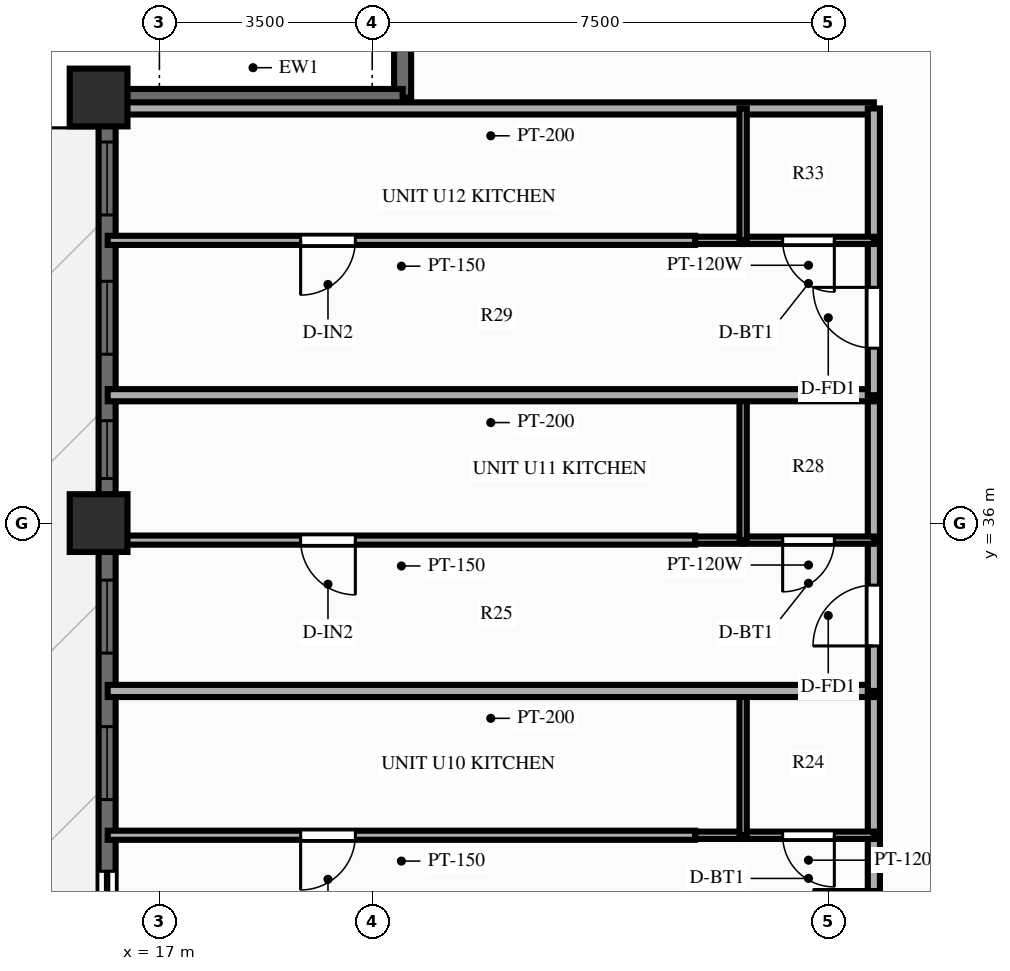
"""IFC4 building model, lengths in metres.
Left out: names, types, materials, properties, quantities, classifications, styles, units other than length and angle.
Written with IfcOpenShell. Run it as: python <this file> out.ifc"""

import sys

from ifc_helpers import new_model, si_unit, direction, frame, frame_2d, origin, origin_2d, place, context, subcontext, project, spatial, rectangle, extrude, source, transform, mapped, element, fill, save


model = new_model("IFC4")
c1 = context("Model", 3, precision=1e-05, world=origin(), true_north=direction((0.0, 1.0)))
c2 = subcontext(c1, "Body", "Model", "MODEL_VIEW")
j1 = project(units=[si_unit("LENGTHUNIT", "METRE"), si_unit("PLANEANGLEUNIT", "RADIAN")], contexts=[c1])
p1 = place(None, origin())
s1 = spatial("IfcSite", under=j1, at=p1, CompositionType="ELEMENT")
p2 = place(p1, origin())
s2 = spatial("IfcBuilding", under=s1, at=p2, CompositionType="ELEMENT")
p3 = place(p2, frame((0.0, 0.0, 169.0)))
s3 = spatial("IfcBuildingStorey", under=s2, at=p3, CompositionType="ELEMENT", Elevation=169.0)
m1 = source(origin(), c2, "Body", "SweptSolid", [
    extrude(rectangle(XDim=0.95, YDim=0.95, at=origin_2d()), origin(), (0.0, 0.0, 1.0), 3.9),
])
for number, where, z_axis, x_axis in (
    (1, (16.0, 43.0, 0.0), (0.0, 0.0, 1.0), (1.0, 0.0, 0.0)),
    (2, (16.0, 36.0, 0.0), (0.0, 0.0, 1.0), (1.0, 0.0, 0.0)),
):
    element("IfcColumn", number, at=place(p3, frame(where, z_axis=z_axis, x_axis=x_axis)), inside=s3, PredefinedType="COLUMN", context=c2, shape_type="MappedRepresentation", body=[
        mapped(m1, transform((0.0, 0.0, 0.0), scale=1.0)),
    ])
p4 = place(p3, frame((16.14, 11.0, 0.0), z_axis=(0.0, 0.0, 1.0), x_axis=(0.0, 1.0, 0.0)))
e3 = element("IfcWall", 3, at=p4, inside=s3, PredefinedType="SOLIDWALL", context=c2, shape_type="SweptSolid", body=[
    extrude(rectangle(XDim=32.0, YDim=0.28, at=frame_2d((16.0, 0.0))), origin(), (0.0, 0.0, 1.0), 2.44),
])
p5 = place(p4, frame((0.8, 0.0, 0.25)))
e4 = element("IfcOpeningElement", 4, at=p5, cuts=e3, PredefinedType="OPENING", context=c2, shape_type="SweptSolid", body=[
    extrude(rectangle(XDim=1.2, YDim=1.5, at=frame_2d((0.6, 0.75))), frame((0.0, 0.152, 0.0), z_axis=(0.0, -1.0, 0.0), x_axis=(1.0, 0.0, 0.0)), (0.0, 0.0, 1.0), 0.304),
])
p6 = place(p4, frame((3.239, 0.0, 0.25)))
e5 = element("IfcOpeningElement", 5, at=p6, cuts=e3, PredefinedType="OPENING", context=c2, shape_type="SweptSolid", body=[
    extrude(rectangle(XDim=1.2, YDim=1.5, at=frame_2d((0.6, 0.75))), frame((0.0, 0.152, 0.0), z_axis=(0.0, -1.0, 0.0), x_axis=(1.0, 0.0, 0.0)), (0.0, 0.0, 1.0), 0.304),
])
p7 = place(p4, frame((5.588, 0.0, 0.25)))
e6 = element("IfcOpeningElement", 6, at=p7, cuts=e3, PredefinedType="OPENING", context=c2, shape_type="SweptSolid", body=[
    extrude(rectangle(XDim=0.7, YDim=1.5, at=frame_2d((0.35, 0.75))), frame((0.0, 0.152, 0.0), z_axis=(0.0, -1.0, 0.0), x_axis=(1.0, 0.0, 0.0)), (0.0, 0.0, 1.0), 0.304),
])
p8 = place(p4, frame((8.085, 0.0, 0.25)))
e7 = element("IfcOpeningElement", 7, at=p8, cuts=e3, PredefinedType="OPENING", context=c2, shape_type="SweptSolid", body=[
    extrude(rectangle(XDim=1.2, YDim=1.5, at=frame_2d((0.6, 0.75))), frame((0.0, 0.152, 0.0), z_axis=(0.0, -1.0, 0.0), x_axis=(1.0, 0.0, 0.0)), (0.0, 0.0, 1.0), 0.304),
])
p9 = place(p4, frame((10.575, 0.0, 0.25)))
e8 = element("IfcOpeningElement", 8, at=p9, cuts=e3, PredefinedType="OPENING", context=c2, shape_type="SweptSolid", body=[
    extrude(rectangle(XDim=1.2, YDim=1.5, at=frame_2d((0.6, 0.75))), frame((0.0, 0.152, 0.0), z_axis=(0.0, -1.0, 0.0), x_axis=(1.0, 0.0, 0.0)), (0.0, 0.0, 1.0), 0.304),
])
p10 = place(p4, frame((13.007, 0.0, 0.25)))
e9 = element("IfcOpeningElement", 9, at=p10, cuts=e3, PredefinedType="OPENING", context=c2, shape_type="SweptSolid", body=[
    extrude(rectangle(XDim=1.2, YDim=1.5, at=frame_2d((0.6, 0.75))), frame((0.0, 0.152, 0.0), z_axis=(0.0, -1.0, 0.0), x_axis=(1.0, 0.0, 0.0)), (0.0, 0.0, 1.0), 0.304),
])
p11 = place(p4, frame((15.4, 0.0, 0.25)))
e10 = element("IfcOpeningElement", 10, at=p11, cuts=e3, PredefinedType="OPENING", context=c2, shape_type="SweptSolid", body=[
    extrude(rectangle(XDim=1.2, YDim=1.5, at=frame_2d((0.6, 0.75))), frame((0.0, 0.152, 0.0), z_axis=(0.0, -1.0, 0.0), x_axis=(1.0, 0.0, 0.0)), (0.0, 0.0, 1.0), 0.304),
])
p12 = place(p4, frame((17.673, 0.0, 0.0)))
e11 = element("IfcOpeningElement", 11, at=p12, cuts=e3, PredefinedType="OPENING", context=c2, shape_type="SweptSolid", body=[
    extrude(rectangle(XDim=1.6, YDim=2.15, at=frame_2d((0.8, 1.075))), frame((0.0, 0.152, 0.0), z_axis=(0.0, -1.0, 0.0), x_axis=(1.0, 0.0, 0.0)), (0.0, 0.0, 1.0), 0.304),
])
p13 = place(p4, frame((20.452, 0.0, 0.25)))
e12 = element("IfcOpeningElement", 12, at=p13, cuts=e3, PredefinedType="OPENING", context=c2, shape_type="SweptSolid", body=[
    extrude(rectangle(XDim=1.2, YDim=1.5, at=frame_2d((0.6, 0.75))), frame((0.0, 0.152, 0.0), z_axis=(0.0, -1.0, 0.0), x_axis=(1.0, 0.0, 0.0)), (0.0, 0.0, 1.0), 0.304),
])
p14 = place(p4, frame((22.862, 0.0, 0.25)))
e13 = element("IfcOpeningElement", 13, at=p14, cuts=e3, PredefinedType="OPENING", context=c2, shape_type="SweptSolid", body=[
    extrude(rectangle(XDim=1.2, YDim=1.5, at=frame_2d((0.6, 0.75))), frame((0.0, 0.152, 0.0), z_axis=(0.0, -1.0, 0.0), x_axis=(1.0, 0.0, 0.0)), (0.0, 0.0, 1.0), 0.304),
])
p15 = place(p4, frame((25.734, 0.0, 0.25)))
e14 = element("IfcOpeningElement", 14, at=p15, cuts=e3, PredefinedType="OPENING", context=c2, shape_type="SweptSolid", body=[
    extrude(rectangle(XDim=0.95, YDim=1.5, at=frame_2d((0.475, 0.75))), frame((0.0, 0.152, 0.0), z_axis=(0.0, -1.0, 0.0), x_axis=(1.0, 0.0, 0.0)), (0.0, 0.0, 1.0), 0.304),
])
p16 = place(p4, frame((27.777, 0.0, 0.25)))
e15 = element("IfcOpeningElement", 15, at=p16, cuts=e3, PredefinedType="OPENING", context=c2, shape_type="SweptSolid", body=[
    extrude(rectangle(XDim=1.2, YDim=1.5, at=frame_2d((0.6, 0.75))), frame((0.0, 0.152, 0.0), z_axis=(0.0, -1.0, 0.0), x_axis=(1.0, 0.0, 0.0)), (0.0, 0.0, 1.0), 0.304),
])
p17 = place(p4, frame((30.068, 0.0, 0.25)))
e16 = element("IfcOpeningElement", 16, at=p17, cuts=e3, PredefinedType="OPENING", context=c2, shape_type="SweptSolid", body=[
    extrude(rectangle(XDim=1.2, YDim=1.5, at=frame_2d((0.6, 0.75))), frame((0.0, 0.152, 0.0), z_axis=(0.0, -1.0, 0.0), x_axis=(1.0, 0.0, 0.0)), (0.0, 0.0, 1.0), 0.304),
])
for number, where, z_axis, x_axis in (
    (17, (21.0, 43.0, 0.0), (0.0, 0.0, 1.0), (0.0, 1.0, 0.0)),
    (18, (16.08, 43.0, 0.0), (0.0, 0.0, 1.0), (1.0, 0.0, 0.0)),
):
    element("IfcWall", number, at=place(p3, frame(where, z_axis=z_axis, x_axis=x_axis)), inside=s3, PredefinedType="SOLIDWALL", context=c2, shape_type="SweptSolid", body=[
        extrude(rectangle(XDim=4.92, YDim=0.28, at=frame_2d((2.46, 0.0))), origin(), (0.0, 0.0, 1.0), 2.44),
    ])
p18 = place(p3, frame((28.75, 42.82, 0.0), z_axis=(0.0, 0.0, 1.0), x_axis=(-1.0, 0.0, 0.0)))
e19 = element("IfcWall", 19, at=p18, inside=s3, PredefinedType="PARTITIONING", context=c2, shape_type="SweptSolid", body=[
    extrude(rectangle(XDim=12.6, YDim=0.2, at=frame_2d((6.3, 0.0))), origin(), (0.0, 0.0, 1.0), 2.24),
])
p19 = place(p3, frame((28.75, 28.08, 0.0), z_axis=(0.0, 0.0, 1.0), x_axis=(0.0, 1.0, 0.0)))
e20 = element("IfcWall", 20, at=p19, inside=s3, PredefinedType="PARTITIONING", context=c2, shape_type="SweptSolid", body=[
    extrude(rectangle(XDim=2.786, YDim=0.2, at=frame_2d((1.393, 0.0))), origin(), (0.0, 0.0, 1.0), 3.56),
])
p20 = place(p19, frame((0.893, 0.0, 0.0)))
e21 = element("IfcOpeningElement", 21, at=p20, cuts=e20, PredefinedType="OPENING", context=c2, shape_type="SweptSolid", body=[
    extrude(rectangle(XDim=1.0, YDim=2.15, at=frame_2d((0.5, 1.075))), frame((0.0, 0.112, 0.0), z_axis=(0.0, -1.0, 0.0), x_axis=(1.0, 0.0, 0.0)), (0.0, 0.0, 1.0), 0.224),
])
p21 = place(p3, frame((28.75, 30.866, 0.0), z_axis=(0.0, 0.0, 1.0), x_axis=(0.0, 1.0, 0.0)))
e22 = element("IfcWall", 22, at=p21, inside=s3, PredefinedType="PARTITIONING", context=c2, shape_type="SweptSolid", body=[
    extrude(rectangle(XDim=2.373, YDim=0.2, at=frame_2d((1.187, 0.0))), origin(), (0.0, 0.0, 1.0), 3.56),
])
p22 = place(p3, frame((28.75, 30.866, 0.0), z_axis=(0.0, 0.0, 1.0), x_axis=(-1.0, 0.0, 0.0)))
e23 = element("IfcWall", 23, at=p22, inside=s3, PredefinedType="PARTITIONING", context=c2, shape_type="SweptSolid", body=[
    extrude(rectangle(XDim=2.15, YDim=0.12, at=frame_2d((1.075, 0.0))), origin(), (0.0, 0.0, 1.0), 3.56),
])
p23 = place(p22, frame((0.65, 0.0, 0.0)))
e24 = element("IfcOpeningElement", 24, at=p23, cuts=e23, PredefinedType="OPENING", context=c2, shape_type="SweptSolid", body=[
    extrude(rectangle(XDim=0.85, YDim=2.05, at=frame_2d((0.425, 1.025))), frame((0.0, 0.072, 0.0), z_axis=(0.0, -1.0, 0.0), x_axis=(1.0, 0.0, 0.0)), (0.0, 0.0, 1.0), 0.144),
])
p24 = place(p3, frame((26.6, 30.866, 0.0), z_axis=(0.0, 0.0, 1.0), x_axis=(-1.0, 0.0, 0.0)))
e25 = element("IfcWall", 25, at=p24, inside=s3, PredefinedType="PARTITIONING", context=c2, shape_type="SweptSolid", body=[
    extrude(rectangle(XDim=0.79, YDim=0.12, at=frame_2d((0.395, 0.0))), origin(), (0.0, 0.0, 1.0), 3.56),
])
p25 = place(p3, frame((26.6, 30.866, 0.0), z_axis=(0.0, 0.0, 1.0), x_axis=(0.0, 1.0, 0.0)))
e26 = element("IfcWall", 26, at=p25, inside=s3, PredefinedType="PARTITIONING", context=c2, shape_type="SweptSolid", body=[
    extrude(rectangle(XDim=2.373, YDim=0.12, at=frame_2d((1.187, 0.0))), origin(), (0.0, 0.0, 1.0), 3.56),
])
p26 = place(p3, frame((25.81, 30.866, 0.0), z_axis=(0.0, 0.0, 1.0), x_axis=(-1.0, 0.0, 0.0)))
e27 = element("IfcWall", 27, at=p26, inside=s3, PredefinedType="PARTITIONING", context=c2, shape_type="SweptSolid", body=[
    extrude(rectangle(XDim=9.66, YDim=0.15, at=frame_2d((4.83, 0.0))), origin(), (0.0, 0.0, 1.0), 3.56),
])
p27 = place(p26, frame((5.587, 0.0, 0.0)))
e28 = element("IfcOpeningElement", 28, at=p27, cuts=e27, PredefinedType="OPENING", context=c2, shape_type="SweptSolid", body=[
    extrude(rectangle(XDim=0.9, YDim=2.1, at=frame_2d((0.45, 1.05))), frame((0.0, 0.087, 0.0), z_axis=(0.0, -1.0, 0.0), x_axis=(1.0, 0.0, 0.0)), (0.0, 0.0, 1.0), 0.174),
])
p28 = place(p3, frame((28.75, 33.239, 0.0), z_axis=(0.0, 0.0, 1.0), x_axis=(-1.0, 0.0, 0.0)))
e29 = element("IfcWall", 29, at=p28, inside=s3, PredefinedType="PARTITIONING", context=c2, shape_type="SweptSolid", body=[
    extrude(rectangle(XDim=12.6, YDim=0.2, at=frame_2d((6.3, 0.0))), origin(), (0.0, 0.0, 1.0), 3.56),
])
p29 = place(p3, frame((28.75, 33.239, 0.0), z_axis=(0.0, 0.0, 1.0), x_axis=(0.0, 1.0, 0.0)))
e30 = element("IfcWall", 30, at=p29, inside=s3, PredefinedType="PARTITIONING", context=c2, shape_type="SweptSolid", body=[
    extrude(rectangle(XDim=2.481, YDim=0.2, at=frame_2d((1.24, 0.0))), origin(), (0.0, 0.0, 1.0), 3.56),
])
p30 = place(p29, frame((0.74, 0.0, 0.0)))
e31 = element("IfcOpeningElement", 31, at=p30, cuts=e30, PredefinedType="OPENING", context=c2, shape_type="SweptSolid", body=[
    extrude(rectangle(XDim=1.0, YDim=2.15, at=frame_2d((0.5, 1.075))), frame((0.0, 0.112, 0.0), z_axis=(0.0, -1.0, 0.0), x_axis=(1.0, 0.0, 0.0)), (0.0, 0.0, 1.0), 0.224),
])
p31 = place(p3, frame((28.75, 35.72, 0.0), z_axis=(0.0, 0.0, 1.0), x_axis=(0.0, 1.0, 0.0)))
e32 = element("IfcWall", 32, at=p31, inside=s3, PredefinedType="PARTITIONING", context=c2, shape_type="SweptSolid", body=[
    extrude(rectangle(XDim=2.383, YDim=0.2, at=frame_2d((1.192, 0.0))), origin(), (0.0, 0.0, 1.0), 3.56),
])
p32 = place(p3, frame((28.75, 35.72, 0.0), z_axis=(0.0, 0.0, 1.0), x_axis=(-1.0, 0.0, 0.0)))
e33 = element("IfcWall", 33, at=p32, inside=s3, PredefinedType="PARTITIONING", context=c2, shape_type="SweptSolid", body=[
    extrude(rectangle(XDim=2.15, YDim=0.12, at=frame_2d((1.075, 0.0))), origin(), (0.0, 0.0, 1.0), 3.56),
])
p33 = place(p32, frame((0.65, 0.0, 0.0)))
e34 = element("IfcOpeningElement", 34, at=p33, cuts=e33, PredefinedType="OPENING", context=c2, shape_type="SweptSolid", body=[
    extrude(rectangle(XDim=0.85, YDim=2.05, at=frame_2d((0.425, 1.025))), frame((0.0, 0.072, 0.0), z_axis=(0.0, -1.0, 0.0), x_axis=(1.0, 0.0, 0.0)), (0.0, 0.0, 1.0), 0.144),
])
p34 = place(p3, frame((26.6, 35.72, 0.0), z_axis=(0.0, 0.0, 1.0), x_axis=(-1.0, 0.0, 0.0)))
e35 = element("IfcWall", 35, at=p34, inside=s3, PredefinedType="PARTITIONING", context=c2, shape_type="SweptSolid", body=[
    extrude(rectangle(XDim=0.79, YDim=0.12, at=frame_2d((0.395, 0.0))), origin(), (0.0, 0.0, 1.0), 3.56),
])
p35 = place(p3, frame((26.6, 35.72, 0.0), z_axis=(0.0, 0.0, 1.0), x_axis=(0.0, 1.0, 0.0)))
e36 = element("IfcWall", 36, at=p35, inside=s3, PredefinedType="PARTITIONING", context=c2, shape_type="SweptSolid", body=[
    extrude(rectangle(XDim=2.383, YDim=0.12, at=frame_2d((1.192, 0.0))), origin(), (0.0, 0.0, 1.0), 3.56),
])
p36 = place(p3, frame((25.81, 35.72, 0.0), z_axis=(0.0, 0.0, 1.0), x_axis=(-1.0, 0.0, 0.0)))
e37 = element("IfcWall", 37, at=p36, inside=s3, PredefinedType="PARTITIONING", context=c2, shape_type="SweptSolid", body=[
    extrude(rectangle(XDim=9.66, YDim=0.15, at=frame_2d((4.83, 0.0))), origin(), (0.0, 0.0, 1.0), 3.56),
])
p37 = place(p36, frame((5.587, 0.0, 0.0)))
e38 = element("IfcOpeningElement", 38, at=p37, cuts=e37, PredefinedType="OPENING", context=c2, shape_type="SweptSolid", body=[
    extrude(rectangle(XDim=0.9, YDim=2.1, at=frame_2d((0.45, 1.05))), frame((0.0, 0.087, 0.0), z_axis=(0.0, -1.0, 0.0), x_axis=(1.0, 0.0, 0.0)), (0.0, 0.0, 1.0), 0.174),
])
p38 = place(p3, frame((28.75, 38.103, 0.0), z_axis=(0.0, 0.0, 1.0), x_axis=(-1.0, 0.0, 0.0)))
e39 = element("IfcWall", 39, at=p38, inside=s3, PredefinedType="PARTITIONING", context=c2, shape_type="SweptSolid", body=[
    extrude(rectangle(XDim=12.6, YDim=0.2, at=frame_2d((6.3, 0.0))), origin(), (0.0, 0.0, 1.0), 3.56),
])
p39 = place(p3, frame((28.75, 38.103, 0.0), z_axis=(0.0, 0.0, 1.0), x_axis=(0.0, 1.0, 0.0)))
e40 = element("IfcWall", 40, at=p39, inside=s3, PredefinedType="PARTITIONING", context=c2, shape_type="SweptSolid", body=[
    extrude(rectangle(XDim=2.547, YDim=0.2, at=frame_2d((1.273, 0.0))), origin(), (0.0, 0.0, 1.0), 3.56),
])
p40 = place(p39, frame((0.774, 0.0, 0.0)))
e41 = element("IfcOpeningElement", 41, at=p40, cuts=e40, PredefinedType="OPENING", context=c2, shape_type="SweptSolid", body=[
    extrude(rectangle(XDim=1.0, YDim=2.15, at=frame_2d((0.5, 1.075))), frame((0.0, 0.112, 0.0), z_axis=(0.0, -1.0, 0.0), x_axis=(1.0, 0.0, 0.0)), (0.0, 0.0, 1.0), 0.224),
])
p41 = place(p3, frame((28.75, 40.65, 0.0), z_axis=(0.0, 0.0, 1.0), x_axis=(0.0, 1.0, 0.0)))
e42 = element("IfcWall", 42, at=p41, inside=s3, PredefinedType="PARTITIONING", context=c2, shape_type="SweptSolid", body=[
    extrude(rectangle(XDim=2.17, YDim=0.2, at=frame_2d((1.085, 0.0))), origin(), (0.0, 0.0, 1.0), 3.56),
])
p42 = place(p3, frame((28.75, 40.65, 0.0), z_axis=(0.0, 0.0, 1.0), x_axis=(-1.0, 0.0, 0.0)))
e43 = element("IfcWall", 43, at=p42, inside=s3, PredefinedType="PARTITIONING", context=c2, shape_type="SweptSolid", body=[
    extrude(rectangle(XDim=2.15, YDim=0.12, at=frame_2d((1.075, 0.0))), origin(), (0.0, 0.0, 1.0), 3.56),
])
p43 = place(p42, frame((0.65, 0.0, 0.0)))
e44 = element("IfcOpeningElement", 44, at=p43, cuts=e43, PredefinedType="OPENING", context=c2, shape_type="SweptSolid", body=[
    extrude(rectangle(XDim=0.85, YDim=2.05, at=frame_2d((0.425, 1.025))), frame((0.0, 0.072, 0.0), z_axis=(0.0, -1.0, 0.0), x_axis=(1.0, 0.0, 0.0)), (0.0, 0.0, 1.0), 0.144),
])
p44 = place(p3, frame((26.6, 40.65, 0.0), z_axis=(0.0, 0.0, 1.0), x_axis=(-1.0, 0.0, 0.0)))
e45 = element("IfcWall", 45, at=p44, inside=s3, PredefinedType="PARTITIONING", context=c2, shape_type="SweptSolid", body=[
    extrude(rectangle(XDim=0.79, YDim=0.12, at=frame_2d((0.395, 0.0))), origin(), (0.0, 0.0, 1.0), 3.56),
])
p45 = place(p3, frame((26.6, 40.65, 0.0), z_axis=(0.0, 0.0, 1.0), x_axis=(0.0, 1.0, 0.0)))
e46 = element("IfcWall", 46, at=p45, inside=s3, PredefinedType="PARTITIONING", context=c2, shape_type="SweptSolid", body=[
    extrude(rectangle(XDim=2.17, YDim=0.12, at=frame_2d((1.085, 0.0))), origin(), (0.0, 0.0, 1.0), 3.56),
])
p46 = place(p3, frame((25.81, 40.65, 0.0), z_axis=(0.0, 0.0, 1.0), x_axis=(-1.0, 0.0, 0.0)))
e47 = element("IfcWall", 47, at=p46, inside=s3, PredefinedType="PARTITIONING", context=c2, shape_type="SweptSolid", body=[
    extrude(rectangle(XDim=9.66, YDim=0.15, at=frame_2d((4.83, 0.0))), origin(), (0.0, 0.0, 1.0), 3.56),
])
p47 = place(p46, frame((5.587, 0.0, 0.0)))
e48 = element("IfcOpeningElement", 48, at=p47, cuts=e47, PredefinedType="OPENING", context=c2, shape_type="SweptSolid", body=[
    extrude(rectangle(XDim=0.9, YDim=2.1, at=frame_2d((0.45, 1.05))), frame((0.0, 0.087, 0.0), z_axis=(0.0, -1.0, 0.0), x_axis=(1.0, 0.0, 0.0)), (0.0, 0.0, 1.0), 0.174),
])
m2 = source(origin(), c2, "Body", "SweptSolid", [
    extrude(rectangle(XDim=1.6, YDim=2.15, at=frame_2d((0.8, 1.075))), frame((0.0, 0.025, 0.0), z_axis=(0.0, -1.0, 0.0), x_axis=(1.0, 0.0, 0.0)), (0.0, 0.0, 1.0), 0.05),
])
p48 = place(p12, origin())
e49 = element("IfcDoor", 49, at=p48, inside=s3, OperationType="SLIDING_TO_LEFT", PredefinedType="DOOR", context=c2, shape_type="MappedRepresentation", body=[
    mapped(m2, transform((0.0, 0.0, 0.0), scale=1.0)),
])
fill(e11, e49)
m3 = source(origin(), c2, "Body", "SweptSolid", [
    extrude(rectangle(XDim=1.2, YDim=1.5, at=frame_2d((0.6, 0.75))), frame((0.0, 0.03, 0.0), z_axis=(0.0, -1.0, 0.0), x_axis=(1.0, 0.0, 0.0)), (0.0, 0.0, 1.0), 0.06),
])
p49 = place(p13, origin())
e50 = element("IfcWindow", 50, at=p49, inside=s3, PartitioningType="SINGLE_PANEL", PredefinedType="WINDOW", context=c2, shape_type="MappedRepresentation", body=[
    mapped(m3, transform((0.0, 0.0, 0.0), scale=1.0)),
])
fill(e12, e50)
p50 = place(p14, origin())
e51 = element("IfcWindow", 51, at=p50, inside=s3, PartitioningType="SINGLE_PANEL", PredefinedType="WINDOW", context=c2, shape_type="MappedRepresentation", body=[
    mapped(m3, transform((0.0, 0.0, 0.0), scale=1.0)),
])
fill(e13, e51)
m4 = source(origin(), c2, "Body", "SweptSolid", [
    extrude(rectangle(XDim=0.95, YDim=1.5, at=frame_2d((0.475, 0.75))), frame((0.0, 0.03, 0.0), z_axis=(0.0, -1.0, 0.0), x_axis=(1.0, 0.0, 0.0)), (0.0, 0.0, 1.0), 0.06),
])
p51 = place(p15, origin())
e52 = element("IfcWindow", 52, at=p51, inside=s3, PartitioningType="SINGLE_PANEL", PredefinedType="WINDOW", context=c2, shape_type="MappedRepresentation", body=[
    mapped(m4, transform((0.0, 0.0, 0.0), scale=1.0)),
])
fill(e14, e52)
p52 = place(p16, origin())
e53 = element("IfcWindow", 53, at=p52, inside=s3, PartitioningType="SINGLE_PANEL", PredefinedType="WINDOW", context=c2, shape_type="MappedRepresentation", body=[
    mapped(m3, transform((0.0, 0.0, 0.0), scale=1.0)),
])
fill(e15, e53)
p53 = place(p17, origin())
e54 = element("IfcWindow", 54, at=p53, inside=s3, PartitioningType="SINGLE_PANEL", PredefinedType="WINDOW", context=c2, shape_type="MappedRepresentation", body=[
    mapped(m3, transform((0.0, 0.0, 0.0), scale=1.0)),
])
fill(e16, e54)
m5 = source(origin(), c2, "Body", "SweptSolid", [
    extrude(rectangle(XDim=1.0, YDim=2.15, at=frame_2d((0.5, 1.075))), frame((0.0, 0.025, 0.0), z_axis=(0.0, -1.0, 0.0), x_axis=(1.0, 0.0, 0.0)), (0.0, 0.0, 1.0), 0.05),
])
p54 = place(p20, origin())
e55 = element("IfcDoor", 55, at=p54, inside=s3, OperationType="SINGLE_SWING_RIGHT", PredefinedType="DOOR", context=c2, shape_type="MappedRepresentation", body=[
    mapped(m5, transform((0.0, 0.0, 0.0), scale=1.0)),
])
fill(e21, e55)
m6 = source(origin(), c2, "Body", "SweptSolid", [
    extrude(rectangle(XDim=0.85, YDim=2.05, at=frame_2d((0.425, 1.025))), frame((0.0, 0.025, 0.0), z_axis=(0.0, -1.0, 0.0), x_axis=(1.0, 0.0, 0.0)), (0.0, 0.0, 1.0), 0.05),
])
p55 = place(p23, origin())
e56 = element("IfcDoor", 56, at=p55, inside=s3, OperationType="SINGLE_SWING_LEFT", PredefinedType="DOOR", context=c2, shape_type="MappedRepresentation", body=[
    mapped(m6, transform((0.0, 0.0, 0.0), scale=1.0)),
])
fill(e24, e56)
m7 = source(origin(), c2, "Body", "SweptSolid", [
    extrude(rectangle(XDim=0.9, YDim=2.1, at=frame_2d((0.45, 1.05))), frame((0.0, 0.025, 0.0), z_axis=(0.0, -1.0, 0.0), x_axis=(1.0, 0.0, 0.0)), (0.0, 0.0, 1.0), 0.05),
])
p56 = place(p27, origin())
e57 = element("IfcDoor", 57, at=p56, inside=s3, OperationType="SINGLE_SWING_RIGHT", PredefinedType="DOOR", context=c2, shape_type="MappedRepresentation", body=[
    mapped(m7, transform((0.0, 0.0, 0.0), scale=1.0)),
])
fill(e28, e57)
p57 = place(p30, origin())
e58 = element("IfcDoor", 58, at=p57, inside=s3, OperationType="SINGLE_SWING_LEFT", PredefinedType="DOOR", context=c2, shape_type="MappedRepresentation", body=[
    mapped(m5, transform((0.0, 0.0, 0.0), scale=1.0)),
])
fill(e31, e58)
p58 = place(p33, origin())
e59 = element("IfcDoor", 59, at=p58, inside=s3, OperationType="SINGLE_SWING_RIGHT", PredefinedType="DOOR", context=c2, shape_type="MappedRepresentation", body=[
    mapped(m6, transform((0.0, 0.0, 0.0), scale=1.0)),
])
fill(e34, e59)
p59 = place(p37, origin())
e60 = element("IfcDoor", 60, at=p59, inside=s3, OperationType="SINGLE_SWING_LEFT", PredefinedType="DOOR", context=c2, shape_type="MappedRepresentation", body=[
    mapped(m7, transform((0.0, 0.0, 0.0), scale=1.0)),
])
fill(e38, e60)
p60 = place(p40, origin())
e61 = element("IfcDoor", 61, at=p60, inside=s3, OperationType="SINGLE_SWING_RIGHT", PredefinedType="DOOR", context=c2, shape_type="MappedRepresentation", body=[
    mapped(m5, transform((0.0, 0.0, 0.0), scale=1.0)),
])
fill(e41, e61)
p61 = place(p43, origin())
e62 = element("IfcDoor", 62, at=p61, inside=s3, OperationType="SINGLE_SWING_LEFT", PredefinedType="DOOR", context=c2, shape_type="MappedRepresentation", body=[
    mapped(m6, transform((0.0, 0.0, 0.0), scale=1.0)),
])
fill(e44, e62)
p62 = place(p47, origin())
e63 = element("IfcDoor", 63, at=p62, inside=s3, OperationType="SINGLE_SWING_RIGHT", PredefinedType="DOOR", context=c2, shape_type="MappedRepresentation", body=[
    mapped(m7, transform((0.0, 0.0, 0.0), scale=1.0)),
])
fill(e48, e63)
save(model, sys.argv[1])
